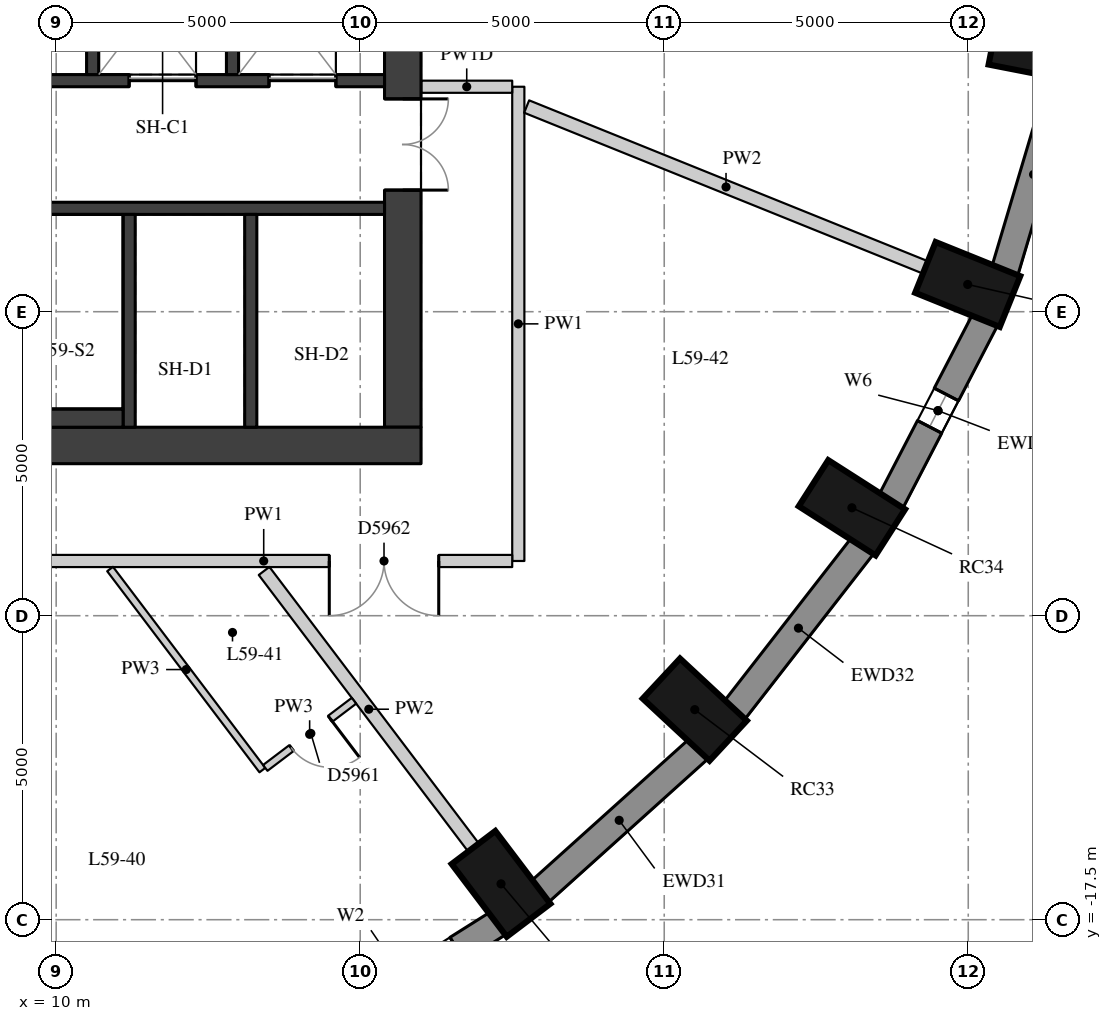
"""IFC4 building model, lengths in metres.
Left out: names, types, materials, properties, quantities, classifications, styles, units other than length and angle.
Written with IfcOpenShell. Run it as: python <this file> out.ifc"""

import sys

from ifc_helpers import new_model, si_unit, direction, frame, frame_2d, origin, origin_2d, place, context, subcontext, project, spatial, rectangle, extrude, element, fill, save


model = new_model("IFC4")
c1 = context("Model", 3, precision=1e-05, world=origin(), true_north=direction((0.0, 1.0)))
c2 = subcontext(c1, "Body", "Model", "MODEL_VIEW")
j1 = project(units=[si_unit("LENGTHUNIT", "METRE"), si_unit("PLANEANGLEUNIT", "RADIAN")], contexts=[c1])
p1 = place(None, origin())
s1 = spatial("IfcSite", under=j1, at=p1, CompositionType="ELEMENT")
p2 = place(p1, origin())
s2 = spatial("IfcBuilding", under=s1, at=p2, CompositionType="ELEMENT")
p3 = place(p2, frame((0.0, 0.0, 209.0)))
s3 = spatial("IfcBuildingStorey", under=s2, at=p3, CompositionType="ELEMENT", Elevation=209.0)
for number, where, z_axis, x_axis in (
    (1, (17.316, -16.911, 0.0), (0.0, 0.0, 1.0), (0.604, -0.797, 0.0)),
    (2, (20.502, -14.045, 0.0), (0.0, 0.0, 1.0), (0.732, -0.681, 0.0)),
    (3, (23.087, -10.725, 0.0), (0.0, 0.0, 1.0), (0.842, -0.539, 0.0)),
    (4, (24.991, -7.052, 0.0), (0.0, 0.0, 1.0), (0.927, -0.374, 0.0)),
    (5, (26.157, -3.137, 0.0), (0.0, 0.0, 1.0), (0.981, -0.192, 0.0)),
):
    element("IfcColumn", number, at=place(p3, frame(where, z_axis=z_axis, x_axis=x_axis)), inside=s3, PredefinedType="COLUMN", context=c2, shape_type="SweptSolid", body=[
        extrude(rectangle(XDim=1.5, YDim=0.9, at=origin_2d()), origin(), (0.0, 0.0, 1.0), 3.3),
    ])
p4 = place(p3, frame((14.232, -19.47, 0.0), z_axis=(0.0, 0.0, 1.0), x_axis=(0.84614984472, 0.532945063098, 0.0)))
e6 = element("IfcWall", 6, at=p4, inside=s3, PredefinedType="SOLIDWALL", context=c2, shape_type="SweptSolid", body=[
    extrude(rectangle(XDim=3.586, YDim=0.45, at=frame_2d((1.793, 0.0))), origin(), (0.0, 0.0, 1.0), 3.02),
])
p5 = place(p4, frame((0.793, 0.0, 0.4)))
e7 = element("IfcOpeningElement", 7, at=p5, cuts=e6, PredefinedType="OPENING", context=c2, shape_type="SweptSolid", body=[
    extrude(rectangle(XDim=2.0, YDim=1.75, at=frame_2d((1.0, 0.875))), frame((0.0, 0.235, 0.0), z_axis=(0.0, -1.0, 0.0), x_axis=(1.0, 0.0, 0.0)), (0.0, 0.0, 1.0), 0.47),
])
p6 = place(p3, frame((17.953, -17.04, 0.0), z_axis=(0.0, 0.0, 1.0), x_axis=(0.743442727602, 0.668799604348, 0.0)))
e8 = element("IfcWall", 8, at=p6, inside=s3, PredefinedType="SOLIDWALL", context=c2, shape_type="SweptSolid", body=[
    extrude(rectangle(XDim=3.513, YDim=0.45, at=frame_2d((1.756, 0.0))), origin(), (0.0, 0.0, 1.0), 3.02),
])
p7 = place(p3, frame((21.151, -14.061, 0.0), z_axis=(0.0, 0.0, 1.0), x_axis=(0.614255239631, 0.789107407509, 0.0)))
e9 = element("IfcWall", 9, at=p7, inside=s3, PredefinedType="SOLIDWALL", context=c2, shape_type="SweptSolid", body=[
    extrude(rectangle(XDim=3.438, YDim=0.45, at=frame_2d((1.719, 0.0))), origin(), (0.0, 0.0, 1.0), 3.02),
])
p8 = place(p3, frame((23.727, -10.624, 0.0), z_axis=(0.0, 0.0, 1.0), x_axis=(0.460175500475, 0.887827972505, 0.0)))
e10 = element("IfcWall", 10, at=p8, inside=s3, PredefinedType="SOLIDWALL", context=c2, shape_type="SweptSolid", body=[
    extrude(rectangle(XDim=3.371, YDim=0.45, at=frame_2d((1.685, 0.0))), origin(), (0.0, 0.0, 1.0), 3.02),
])
p9 = place(p8, frame((1.385, 0.0, 0.4)))
e11 = element("IfcOpeningElement", 11, at=p9, cuts=e10, PredefinedType="OPENING", context=c2, shape_type="SweptSolid", body=[
    extrude(rectangle(XDim=0.6, YDim=1.75, at=frame_2d((0.3, 0.875))), frame((0.0, 0.235, 0.0), z_axis=(0.0, -1.0, 0.0), x_axis=(1.0, 0.0, 0.0)), (0.0, 0.0, 1.0), 0.47),
])
p10 = place(p3, frame((25.6, -6.834, 0.0), z_axis=(0.0, 0.0, 1.0), x_axis=(0.285444972963, 0.958395099847, 0.0)))
e12 = element("IfcWall", 12, at=p10, inside=s3, PredefinedType="SOLIDWALL", context=c2, shape_type="SweptSolid", body=[
    extrude(rectangle(XDim=3.32, YDim=0.45, at=frame_2d((1.66, 0.0))), origin(), (0.0, 0.0, 1.0), 3.02),
])
p11 = place(p3, frame((15.7, -9.4, 0.0), z_axis=(0.0, 0.0, 1.0), x_axis=(0.0, 1.0, 0.0)))
e13 = element("IfcWall", 13, at=p11, inside=s3, PredefinedType="SHEAR", context=c2, shape_type="SweptSolid", body=[
    extrude(rectangle(XDim=18.8, YDim=0.6, at=frame_2d((9.4, 0.0))), origin(), (0.0, 0.0, 1.0), 3.02),
])
p12 = place(p11, frame((13.4, 0.0, 0.0)))
e14 = element("IfcOpeningElement", 14, at=p12, cuts=e13, PredefinedType="OPENING", context=c2, shape_type="SweptSolid", body=[
    extrude(rectangle(XDim=1.5, YDim=2.1, at=frame_2d((0.75, 1.05))), frame((0.0, 0.31, 0.0), z_axis=(0.0, -1.0, 0.0), x_axis=(1.0, 0.0, 0.0)), (0.0, 0.0, 1.0), 0.62),
])
p13 = place(p11, frame((3.9, 0.0, 0.0)))
e15 = element("IfcOpeningElement", 15, at=p13, cuts=e13, PredefinedType="OPENING", context=c2, shape_type="SweptSolid", body=[
    extrude(rectangle(XDim=1.5, YDim=2.1, at=frame_2d((0.75, 1.05))), frame((0.0, 0.31, 0.0), z_axis=(0.0, -1.0, 0.0), x_axis=(1.0, 0.0, 0.0)), (0.0, 0.0, 1.0), 0.62),
])
p14 = place(p3, frame((4.0, -9.7, 0.0), z_axis=(0.0, 0.0, 1.0), x_axis=(1.0, 0.0, 0.0)))
e16 = element("IfcWall", 16, at=p14, inside=s3, PredefinedType="SHEAR", context=c2, shape_type="SweptSolid", body=[
    extrude(rectangle(XDim=12.0, YDim=0.6, at=frame_2d((6.0, 0.0))), origin(), (0.0, 0.0, 1.0), 3.02),
])
p15 = place(p3, frame((4.6, -3.7, 0.0), z_axis=(0.0, 0.0, 1.0), x_axis=(1.0, 0.0, 0.0)))
e17 = element("IfcWall", 17, at=p15, inside=s3, PredefinedType="SHEAR", context=c2, shape_type="SweptSolid", body=[
    extrude(rectangle(XDim=10.8, YDim=0.2, at=frame_2d((5.4, 0.0))), origin(), (0.0, 0.0, 1.0), 3.02),
])
p16 = place(p15, frame((6.6, 0.0, 0.0)))
e18 = element("IfcOpeningElement", 18, at=p16, cuts=e17, PredefinedType="OPENING", context=c2, shape_type="SweptSolid", body=[
    extrude(rectangle(XDim=1.1, YDim=2.1, at=frame_2d((0.55, 1.05))), frame((0.0, 0.11, 0.0), z_axis=(0.0, -1.0, 0.0), x_axis=(1.0, 0.0, 0.0)), (0.0, 0.0, 1.0), 0.22),
])
p17 = place(p15, frame((8.9, 0.0, 0.0)))
e19 = element("IfcOpeningElement", 19, at=p17, cuts=e17, PredefinedType="OPENING", context=c2, shape_type="SweptSolid", body=[
    extrude(rectangle(XDim=1.1, YDim=2.1, at=frame_2d((0.55, 1.05))), frame((0.0, 0.11, 0.0), z_axis=(0.0, -1.0, 0.0), x_axis=(1.0, 0.0, 0.0)), (0.0, 0.0, 1.0), 0.22),
])
p18 = place(p3, frame((4.6, -5.8, 0.0), z_axis=(0.0, 0.0, 1.0), x_axis=(1.0, 0.0, 0.0)))
e20 = element("IfcWall", 20, at=p18, inside=s3, PredefinedType="SHEAR", context=c2, shape_type="SweptSolid", body=[
    extrude(rectangle(XDim=10.8, YDim=0.2, at=frame_2d((5.4, 0.0))), origin(), (0.0, 0.0, 1.0), 3.02),
])
for number, where, z_axis, x_axis in (
    (21, (11.2, -9.4, 0.0), (0.0, 0.0, 1.0), (0.0, 1.0, 0.0)),
    (22, (13.2, -9.4, 0.0), (0.0, 0.0, 1.0), (0.0, 1.0, 0.0)),
):
    element("IfcWall", number, at=place(p3, frame(where, z_axis=z_axis, x_axis=x_axis)), inside=s3, PredefinedType="SHEAR", context=c2, shape_type="SweptSolid", body=[
        extrude(rectangle(XDim=3.5, YDim=0.2, at=frame_2d((1.75, 0.0))), origin(), (0.0, 0.0, 1.0), 3.02),
    ])
for number, where, z_axis, x_axis in (
    (23, (10.6, -3.6, 0.0), (0.0, 0.0, 1.0), (0.0, 1.0, 0.0)),
    (24, (12.9, -3.6, 0.0), (0.0, 0.0, 1.0), (0.0, 1.0, 0.0)),
):
    element("IfcWall", number, at=place(p3, frame(where, z_axis=z_axis, x_axis=x_axis)), inside=s3, PredefinedType="SHEAR", context=c2, shape_type="SweptSolid", body=[
        extrude(rectangle(XDim=2.5, YDim=0.2, at=frame_2d((1.25, 0.0))), origin(), (0.0, 0.0, 1.0), 3.02),
    ])
p19 = place(p3, frame((6.22, -9.25, 0.0), z_axis=(0.0, 0.0, 1.0), x_axis=(1.0, 0.0, 0.0)))
e25 = element("IfcWall", 25, at=p19, inside=s3, PredefinedType="PARTITIONING", context=c2, shape_type="SweptSolid", body=[
    extrude(rectangle(XDim=4.88, YDim=0.3, at=frame_2d((2.44, 0.0))), origin(), (0.0, 0.0, 1.0), 3.02),
])
p20 = place(p3, frame((17.6, -3.8, 0.0), z_axis=(0.0, 0.0, 1.0), x_axis=(0.0, -1.0, 0.0)))
e26 = element("IfcWall", 26, at=p20, inside=s3, PredefinedType="PARTITIONING", context=c2, shape_type="SweptSolid", body=[
    extrude(rectangle(XDim=7.8, YDim=0.2, at=frame_2d((3.9, 0.0))), origin(), (0.0, 0.0, 1.0), 3.02),
])
p21 = place(p3, frame((17.5, -11.6, 0.0), z_axis=(0.0, 0.0, 1.0), x_axis=(-1.0, 0.0, 0.0)))
e27 = element("IfcWall", 27, at=p21, inside=s3, PredefinedType="PARTITIONING", context=c2, shape_type="SweptSolid", body=[
    extrude(rectangle(XDim=8.174, YDim=0.2, at=frame_2d((4.087, 0.0))), origin(), (0.0, 0.0, 1.0), 3.02),
])
p22 = place(p21, frame((1.208, 0.0, 0.0)))
e28 = element("IfcOpeningElement", 28, at=p22, cuts=e27, PredefinedType="OPENING", context=c2, shape_type="SweptSolid", body=[
    extrude(rectangle(XDim=1.8, YDim=2.1, at=frame_2d((0.9, 1.05))), frame((0.0, 0.11, 0.0), z_axis=(0.0, -1.0, 0.0), x_axis=(1.0, 0.0, 0.0)), (0.0, 0.0, 1.0), 0.22),
])
p23 = place(p3, frame((16.004, -3.8, 0.0), z_axis=(0.0, 0.0, 1.0), x_axis=(1.0, 0.0, 0.0)))
e29 = element("IfcWall", 29, at=p23, inside=s3, PredefinedType="PARTITIONING", context=c2, shape_type="SweptSolid", body=[
    extrude(rectangle(XDim=1.496, YDim=0.2, at=frame_2d((0.748, 0.0))), origin(), (0.0, 0.0, 1.0), 2.47),
])
p24 = place(p3, frame((16.863, -16.312, 0.0), z_axis=(0.0, 0.0, 1.0), x_axis=(-0.603636051313, 0.797260006243, 0.0)))
e30 = element("IfcWall", 30, at=p24, inside=s3, PredefinedType="PARTITIONING", context=c2, shape_type="SweptSolid", body=[
    extrude(rectangle(XDim=5.706, YDim=0.22, at=frame_2d((2.853, 0.0))), origin(), (0.0, 0.0, 1.0), 3.02),
])
p25 = place(p3, frame((24.295, -6.771, 0.0), z_axis=(0.0, 0.0, 1.0), x_axis=(-0.927375021142, 0.374133091509, 0.0)))
e31 = element("IfcWall", 31, at=p25, inside=s3, PredefinedType="PARTITIONING", context=c2, shape_type="SweptSolid", body=[
    extrude(rectangle(XDim=7.072, YDim=0.22, at=frame_2d((3.536, 0.0))), origin(), (0.0, 0.0, 1.0), 3.02),
])
p26 = place(p3, frame((10.887, -11.732, 0.0), z_axis=(0.0, 0.0, 1.0), x_axis=(0.603646932038, -0.797251767913, 0.0)))
e32 = element("IfcWall", 32, at=p26, inside=s3, PredefinedType="PARTITIONING", context=c2, shape_type="SweptSolid", body=[
    extrude(rectangle(XDim=4.149, YDim=0.12, at=frame_2d((2.074, 0.0))), origin(), (0.0, 0.0, 1.0), 3.02),
])
p27 = place(p3, frame((13.439, -15.003, 0.0), z_axis=(0.0, 0.0, 1.0), x_axis=(0.797238062708, 0.603665032422, 0.0)))
e33 = element("IfcWall", 33, at=p27, inside=s3, PredefinedType="PARTITIONING", context=c2, shape_type="SweptSolid", body=[
    extrude(rectangle(XDim=1.83, YDim=0.12, at=frame_2d((0.915, 0.0))), origin(), (0.0, 0.0, 1.0), 3.02),
])
p28 = place(p27, frame((0.54, 0.0, 0.0)))
e34 = element("IfcOpeningElement", 34, at=p28, cuts=e33, PredefinedType="OPENING", context=c2, shape_type="SweptSolid", body=[
    extrude(rectangle(XDim=0.8, YDim=2.1, at=frame_2d((0.4, 1.05))), frame((0.0, 0.07, 0.0), z_axis=(0.0, -1.0, 0.0), x_axis=(1.0, 0.0, 0.0)), (0.0, 0.0, 1.0), 0.14),
])
p29 = place(p9, origin())
e35 = element("IfcWindow", 35, at=p29, inside=s3, PartitioningType="SINGLE_PANEL", PredefinedType="WINDOW", context=c2, shape_type="SweptSolid", body=[
    extrude(rectangle(XDim=0.6, YDim=1.75, at=frame_2d((0.3, 0.875))), frame((0.0, 0.035, 0.0), z_axis=(0.0, -1.0, 0.0), x_axis=(1.0, 0.0, 0.0)), (0.0, 0.0, 1.0), 0.06),
])
fill(e11, e35)
p30 = place(p13, origin())
e36 = element("IfcDoor", 36, at=p30, inside=s3, OperationType="DOUBLE_DOOR_SINGLE_SWING", PredefinedType="DOOR", context=c2, shape_type="SweptSolid", body=[
    extrude(rectangle(XDim=1.5, YDim=2.1, at=frame_2d((0.75, 1.05))), frame((0.0, 0.025, 0.0), z_axis=(0.0, -1.0, 0.0), x_axis=(1.0, 0.0, 0.0)), (0.0, 0.0, 1.0), 0.05),
])
fill(e15, e36)
p31 = place(p16, origin())
e37 = element("IfcDoor", 37, at=p31, inside=s3, OperationType="DOUBLE_DOOR_SLIDING", PredefinedType="DOOR", context=c2, shape_type="SweptSolid", body=[
    extrude(rectangle(XDim=1.1, YDim=2.1, at=frame_2d((0.55, 1.05))), frame((0.0, 0.025, 0.0), z_axis=(0.0, -1.0, 0.0), x_axis=(1.0, 0.0, 0.0)), (0.0, 0.0, 1.0), 0.05),
])
fill(e18, e37)
p32 = place(p17, origin())
e38 = element("IfcDoor", 38, at=p32, inside=s3, OperationType="DOUBLE_DOOR_SLIDING", PredefinedType="DOOR", context=c2, shape_type="SweptSolid", body=[
    extrude(rectangle(XDim=1.1, YDim=2.1, at=frame_2d((0.55, 1.05))), frame((0.0, 0.025, 0.0), z_axis=(0.0, -1.0, 0.0), x_axis=(1.0, 0.0, 0.0)), (0.0, 0.0, 1.0), 0.05),
])
fill(e19, e38)
p33 = place(p28, origin())
e39 = element("IfcDoor", 39, at=p33, inside=s3, OperationType="SINGLE_SWING_LEFT", PredefinedType="DOOR", context=c2, shape_type="SweptSolid", body=[
    extrude(rectangle(XDim=0.8, YDim=2.1, at=frame_2d((0.4, 1.05))), frame((0.0, 0.025, 0.0), z_axis=(0.0, -1.0, 0.0), x_axis=(1.0, 0.0, 0.0)), (0.0, 0.0, 1.0), 0.05),
])
fill(e34, e39)
p34 = place(p22, origin())
e40 = element("IfcDoor", 40, at=p34, inside=s3, OperationType="DOUBLE_DOOR_SINGLE_SWING", PredefinedType="DOOR", context=c2, shape_type="SweptSolid", body=[
    extrude(rectangle(XDim=1.8, YDim=2.1, at=frame_2d((0.9, 1.05))), frame((0.0, 0.025, 0.0), z_axis=(0.0, -1.0, 0.0), x_axis=(1.0, 0.0, 0.0)), (0.0, 0.0, 1.0), 0.05),
])
fill(e28, e40)
save(model, sys.argv[1])
